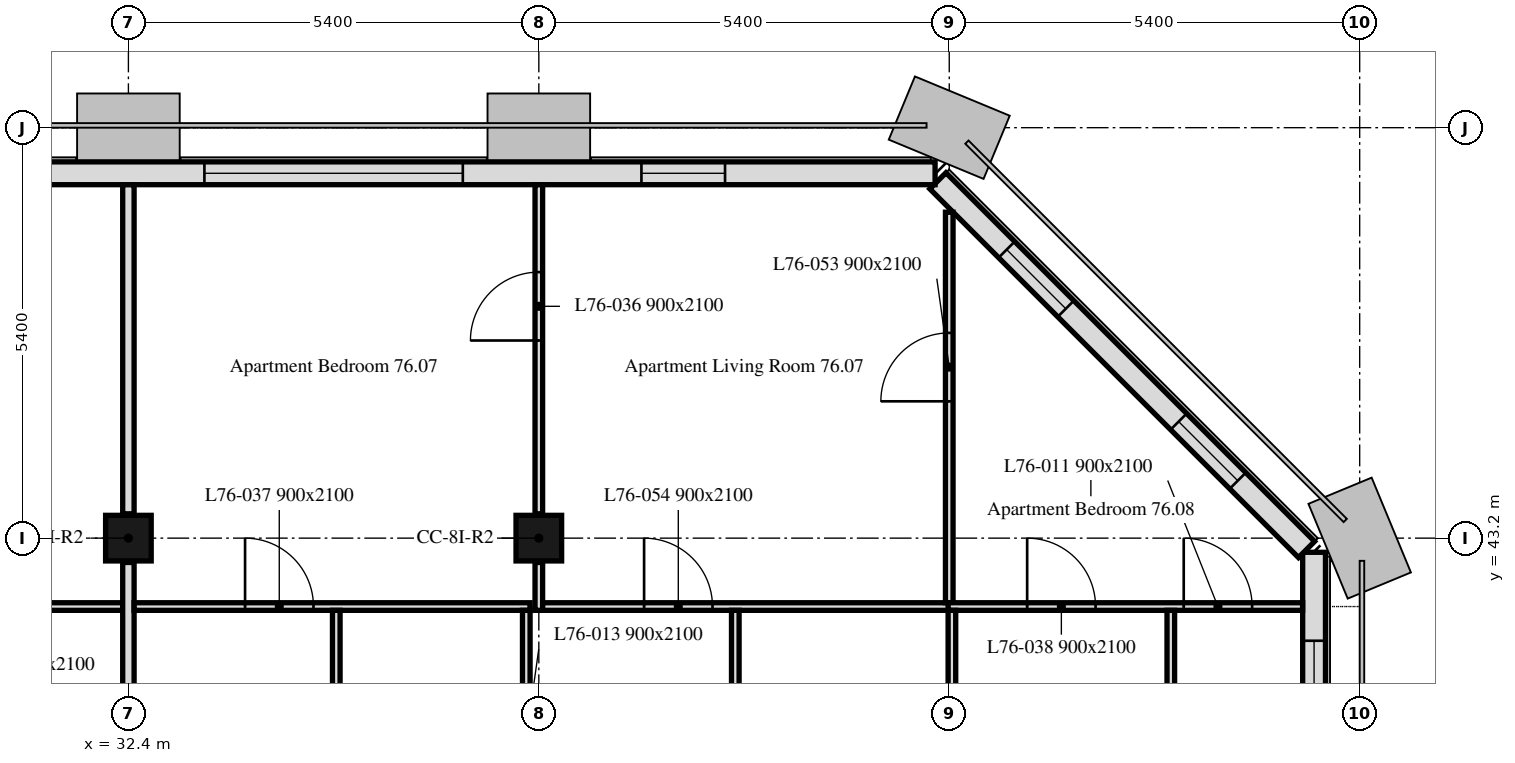
"""IFC4 building model, lengths in metres.
Left out: names, types, materials, properties, quantities, classifications, styles, units other than length and angle.
Written with IfcOpenShell. Run it as: python <this file> out.ifc"""

import sys

from ifc_helpers import new_model, si_unit, direction, frame, frame_2d, origin, origin_2d, place, context, subcontext, project, spatial, rectangle, extrude, element, fill, save


model = new_model("IFC4")
c1 = context("Model", 3, precision=1e-05, world=origin(), true_north=direction((0.0, 1.0)))
c2 = subcontext(c1, "Body", "Model", "MODEL_VIEW")
j1 = project(units=[si_unit("LENGTHUNIT", "METRE"), si_unit("PLANEANGLEUNIT", "RADIAN")], contexts=[c1])
p1 = place(None, origin())
s1 = spatial("IfcSite", under=j1, at=p1, CompositionType="ELEMENT")
p2 = place(p1, origin())
s2 = spatial("IfcBuilding", under=s1, at=p2, CompositionType="ELEMENT")
p3 = place(p2, frame((0.0, 0.0, 304.9)))
s3 = spatial("IfcBuildingStorey", under=s2, at=p3, CompositionType="ELEMENT", Elevation=304.9)
for number, where, z_axis, x_axis in (
    (1, (32.4, 43.2, 0.0), (0.0, 0.0, 1.0), (1.0, 0.0, 0.0)),
    (2, (37.8, 43.2, 0.0), (0.0, 0.0, 1.0), (1.0, 0.0, 0.0)),
):
    element("IfcColumn", number, at=place(p3, frame(where, z_axis=z_axis, x_axis=x_axis)), inside=s3, PredefinedType="COLUMN", context=c2, shape_type="SweptSolid", body=[
        extrude(rectangle(XDim=0.6, YDim=0.6, at=origin_2d()), origin(), (0.0, 0.0, 1.0), 2.8),
    ])
p4 = place(p3, frame((48.0, 10.986, 0.0), z_axis=(0.0, 0.0, 1.0), x_axis=(0.0, 1.0, 0.0)))
e3 = element("IfcWall", 3, at=p4, inside=s3, PredefinedType="SOLIDWALL", context=c2, shape_type="SweptSolid", body=[
    extrude(rectangle(XDim=32.027, YDim=0.3, at=frame_2d((16.014, 0.0))), origin(), (0.0, 0.0, 1.0), 2.8),
])
p5 = place(p4, frame((1.314, 0.0, 0.9)))
e4 = element("IfcOpeningElement", 4, at=p5, cuts=e3, PredefinedType="OPENING", context=c2, shape_type="SweptSolid", body=[
    extrude(rectangle(XDim=1.1, YDim=1.7, at=frame_2d((0.55, 0.85))), frame((0.0, 0.16, 0.0), z_axis=(0.0, -1.0, 0.0), x_axis=(1.0, 0.0, 0.0)), (0.0, 0.0, 1.0), 0.32),
])
p6 = place(p4, frame((2.589, 0.0, 0.9)))
e5 = element("IfcOpeningElement", 5, at=p6, cuts=e3, PredefinedType="OPENING", context=c2, shape_type="SweptSolid", body=[
    extrude(rectangle(XDim=0.65, YDim=1.7, at=frame_2d((0.325, 0.85))), frame((0.0, 0.16, 0.0), z_axis=(0.0, -1.0, 0.0), x_axis=(1.0, 0.0, 0.0)), (0.0, 0.0, 1.0), 0.32),
])
p7 = place(p4, frame((6.214, 0.0, 0.9)))
e6 = element("IfcOpeningElement", 6, at=p7, cuts=e3, PredefinedType="OPENING", context=c2, shape_type="SweptSolid", body=[
    extrude(rectangle(XDim=3.4, YDim=1.7, at=frame_2d((1.7, 0.85))), frame((0.0, 0.16, 0.0), z_axis=(0.0, -1.0, 0.0), x_axis=(1.0, 0.0, 0.0)), (0.0, 0.0, 1.0), 0.32),
])
p8 = place(p4, frame((11.964, 0.0, 0.9)))
e7 = element("IfcOpeningElement", 7, at=p8, cuts=e3, PredefinedType="OPENING", context=c2, shape_type="SweptSolid", body=[
    extrude(rectangle(XDim=1.1, YDim=1.7, at=frame_2d((0.55, 0.85))), frame((0.0, 0.16, 0.0), z_axis=(0.0, -1.0, 0.0), x_axis=(1.0, 0.0, 0.0)), (0.0, 0.0, 1.0), 0.32),
])
p9 = place(p4, frame((13.564, 0.0, 0.9)))
e8 = element("IfcOpeningElement", 8, at=p9, cuts=e3, PredefinedType="OPENING", context=c2, shape_type="SweptSolid", body=[
    extrude(rectangle(XDim=1.1, YDim=1.7, at=frame_2d((0.55, 0.85))), frame((0.0, 0.16, 0.0), z_axis=(0.0, -1.0, 0.0), x_axis=(1.0, 0.0, 0.0)), (0.0, 0.0, 1.0), 0.32),
])
p10 = place(p4, frame((17.014, 0.0, 0.9)))
e9 = element("IfcOpeningElement", 9, at=p10, cuts=e3, PredefinedType="OPENING", context=c2, shape_type="SweptSolid", body=[
    extrude(rectangle(XDim=3.4, YDim=1.7, at=frame_2d((1.7, 0.85))), frame((0.0, 0.16, 0.0), z_axis=(0.0, -1.0, 0.0), x_axis=(1.0, 0.0, 0.0)), (0.0, 0.0, 1.0), 0.32),
])
p11 = place(p4, frame((23.389, 0.0, 0.9)))
e10 = element("IfcOpeningElement", 10, at=p11, cuts=e3, PredefinedType="OPENING", context=c2, shape_type="SweptSolid", body=[
    extrude(rectangle(XDim=0.65, YDim=1.7, at=frame_2d((0.325, 0.85))), frame((0.0, 0.16, 0.0), z_axis=(0.0, -1.0, 0.0), x_axis=(1.0, 0.0, 0.0)), (0.0, 0.0, 1.0), 0.32),
])
p12 = place(p4, frame((24.364, 0.0, 0.9)))
e11 = element("IfcOpeningElement", 11, at=p12, cuts=e3, PredefinedType="OPENING", context=c2, shape_type="SweptSolid", body=[
    extrude(rectangle(XDim=1.1, YDim=1.7, at=frame_2d((0.55, 0.85))), frame((0.0, 0.16, 0.0), z_axis=(0.0, -1.0, 0.0), x_axis=(1.0, 0.0, 0.0)), (0.0, 0.0, 1.0), 0.32),
])
p13 = place(p4, frame((28.164, 0.0, 0.9)))
e12 = element("IfcOpeningElement", 12, at=p13, cuts=e3, PredefinedType="OPENING", context=c2, shape_type="SweptSolid", body=[
    extrude(rectangle(XDim=1.1, YDim=1.7, at=frame_2d((0.55, 0.85))), frame((0.0, 0.16, 0.0), z_axis=(0.0, -1.0, 0.0), x_axis=(1.0, 0.0, 0.0)), (0.0, 0.0, 1.0), 0.32),
])
p14 = place(p4, frame((29.764, 0.0, 0.9)))
e13 = element("IfcOpeningElement", 13, at=p14, cuts=e3, PredefinedType="OPENING", context=c2, shape_type="SweptSolid", body=[
    extrude(rectangle(XDim=1.1, YDim=1.7, at=frame_2d((0.55, 0.85))), frame((0.0, 0.16, 0.0), z_axis=(0.0, -1.0, 0.0), x_axis=(1.0, 0.0, 0.0)), (0.0, 0.0, 1.0), 0.32),
])
p15 = place(p3, frame((47.901, 43.051, 0.0), z_axis=(0.0, 0.0, 1.0), x_axis=(-0.707106781187, 0.707106781187, 0.0)))
e14 = element("IfcWall", 14, at=p15, inside=s3, PredefinedType="SOLIDWALL", context=c2, shape_type="SweptSolid", body=[
    extrude(rectangle(XDim=6.86, YDim=0.3, at=frame_2d((3.43, 0.0))), origin(), (0.0, 0.0, 1.0), 2.8),
])
p16 = place(p15, frame((1.28, 0.0, 0.9)))
e15 = element("IfcOpeningElement", 15, at=p16, cuts=e14, PredefinedType="OPENING", context=c2, shape_type="SweptSolid", body=[
    extrude(rectangle(XDim=1.1, YDim=1.7, at=frame_2d((0.55, 0.85))), frame((0.0, 0.16, 0.0), z_axis=(0.0, -1.0, 0.0), x_axis=(1.0, 0.0, 0.0)), (0.0, 0.0, 1.0), 0.32),
])
p17 = place(p15, frame((4.48, 0.0, 0.9)))
e16 = element("IfcOpeningElement", 16, at=p17, cuts=e14, PredefinedType="OPENING", context=c2, shape_type="SweptSolid", body=[
    extrude(rectangle(XDim=1.1, YDim=1.7, at=frame_2d((0.55, 0.85))), frame((0.0, 0.16, 0.0), z_axis=(0.0, -1.0, 0.0), x_axis=(1.0, 0.0, 0.0)), (0.0, 0.0, 1.0), 0.32),
])
p18 = place(p3, frame((43.014, 48.0, 0.0), z_axis=(0.0, 0.0, 1.0), x_axis=(-1.0, 0.0, 0.0)))
e17 = element("IfcWall", 17, at=p18, inside=s3, PredefinedType="SOLIDWALL", context=c2, shape_type="SweptSolid", body=[
    extrude(rectangle(XDim=32.027, YDim=0.3, at=frame_2d((16.014, 0.0))), origin(), (0.0, 0.0, 1.0), 2.8),
])
p19 = place(p18, frame((2.764, 0.0, 0.9)))
e18 = element("IfcOpeningElement", 18, at=p19, cuts=e17, PredefinedType="OPENING", context=c2, shape_type="SweptSolid", body=[
    extrude(rectangle(XDim=1.1, YDim=1.7, at=frame_2d((0.55, 0.85))), frame((0.0, 0.16, 0.0), z_axis=(0.0, -1.0, 0.0), x_axis=(1.0, 0.0, 0.0)), (0.0, 0.0, 1.0), 0.32),
])
p20 = place(p18, frame((6.214, 0.0, 0.9)))
e19 = element("IfcOpeningElement", 19, at=p20, cuts=e17, PredefinedType="OPENING", context=c2, shape_type="SweptSolid", body=[
    extrude(rectangle(XDim=3.4, YDim=1.7, at=frame_2d((1.7, 0.85))), frame((0.0, 0.16, 0.0), z_axis=(0.0, -1.0, 0.0), x_axis=(1.0, 0.0, 0.0)), (0.0, 0.0, 1.0), 0.32),
])
p21 = place(p18, frame((13.564, 0.0, 0.9)))
e20 = element("IfcOpeningElement", 20, at=p21, cuts=e17, PredefinedType="OPENING", context=c2, shape_type="SweptSolid", body=[
    extrude(rectangle(XDim=1.1, YDim=1.7, at=frame_2d((0.55, 0.85))), frame((0.0, 0.16, 0.0), z_axis=(0.0, -1.0, 0.0), x_axis=(1.0, 0.0, 0.0)), (0.0, 0.0, 1.0), 0.32),
])
p22 = place(p18, frame((17.014, 0.0, 0.9)))
e21 = element("IfcOpeningElement", 21, at=p22, cuts=e17, PredefinedType="OPENING", context=c2, shape_type="SweptSolid", body=[
    extrude(rectangle(XDim=3.4, YDim=1.7, at=frame_2d((1.7, 0.85))), frame((0.0, 0.16, 0.0), z_axis=(0.0, -1.0, 0.0), x_axis=(1.0, 0.0, 0.0)), (0.0, 0.0, 1.0), 0.32),
])
p23 = place(p18, frame((24.364, 0.0, 0.9)))
e22 = element("IfcOpeningElement", 22, at=p23, cuts=e17, PredefinedType="OPENING", context=c2, shape_type="SweptSolid", body=[
    extrude(rectangle(XDim=1.1, YDim=1.7, at=frame_2d((0.55, 0.85))), frame((0.0, 0.16, 0.0), z_axis=(0.0, -1.0, 0.0), x_axis=(1.0, 0.0, 0.0)), (0.0, 0.0, 1.0), 0.32),
])
p24 = place(p18, frame((27.814, 0.0, 0.9)))
e23 = element("IfcOpeningElement", 23, at=p24, cuts=e17, PredefinedType="OPENING", context=c2, shape_type="SweptSolid", body=[
    extrude(rectangle(XDim=3.4, YDim=1.7, at=frame_2d((1.7, 0.85))), frame((0.0, 0.16, 0.0), z_axis=(0.0, -1.0, 0.0), x_axis=(1.0, 0.0, 0.0)), (0.0, 0.0, 1.0), 0.32),
])
p25 = place(p3, frame((27.05, 42.3, 0.0), z_axis=(0.0, 0.0, 1.0), x_axis=(1.0, 0.0, 0.0)))
e24 = element("IfcWall", 24, at=p25, inside=s3, PredefinedType="PARTITIONING", context=c2, shape_type="SweptSolid", body=[
    extrude(rectangle(XDim=5.275, YDim=0.1, at=frame_2d((2.637, 0.0))), origin(), (0.0, 0.0, 1.0), 2.8),
])
p26 = place(p25, frame((2.7, 0.0, 0.0)))
e25 = element("IfcOpeningElement", 25, at=p26, cuts=e24, PredefinedType="OPENING", context=c2, shape_type="SweptSolid", body=[
    extrude(rectangle(XDim=0.9, YDim=2.1, at=frame_2d((0.45, 1.05))), frame((0.0, 0.05, 0.0), z_axis=(0.0, -1.0, 0.0), x_axis=(1.0, 0.0, 0.0)), (0.0, 0.0, 1.0), 0.1),
])
p27 = place(p3, frame((32.4, 43.52, 0.0), z_axis=(0.0, 0.0, 1.0), x_axis=(0.0, 1.0, 0.0)))
e26 = element("IfcWall", 26, at=p27, inside=s3, PredefinedType="PARTITIONING", context=c2, shape_type="SweptSolid", body=[
    extrude(rectangle(XDim=4.329, YDim=0.15, at=frame_2d((2.165, 0.0))), origin(), (0.0, 0.0, 1.0), 2.2),
])
p28 = place(p3, frame((32.4, 38.12, 0.0), z_axis=(0.0, 0.0, 1.0), x_axis=(0.0, 1.0, 0.0)))
e27 = element("IfcWall", 27, at=p28, inside=s3, PredefinedType="PARTITIONING", context=c2, shape_type="SweptSolid", body=[
    extrude(rectangle(XDim=4.76, YDim=0.15, at=frame_2d((2.38, 0.0))), origin(), (0.0, 0.0, 1.0), 2.2),
])
p29 = place(p3, frame((32.475, 42.3, 0.0), z_axis=(0.0, 0.0, 1.0), x_axis=(1.0, 0.0, 0.0)))
e28 = element("IfcWall", 28, at=p29, inside=s3, PredefinedType="PARTITIONING", context=c2, shape_type="SweptSolid", body=[
    extrude(rectangle(XDim=5.21, YDim=0.1, at=frame_2d((2.605, 0.0))), origin(), (0.0, 0.0, 1.0), 2.8),
])
p30 = place(p29, frame((1.46, 0.0, 0.0)))
e29 = element("IfcOpeningElement", 29, at=p30, cuts=e28, PredefinedType="OPENING", context=c2, shape_type="SweptSolid", body=[
    extrude(rectangle(XDim=0.9, YDim=2.1, at=frame_2d((0.45, 1.05))), frame((0.0, 0.05, 0.0), z_axis=(0.0, -1.0, 0.0), x_axis=(1.0, 0.0, 0.0)), (0.0, 0.0, 1.0), 0.1),
])
p31 = place(p3, frame((37.8, 42.25, 0.0), z_axis=(0.0, 0.0, 1.0), x_axis=(0.0, 1.0, 0.0)))
e30 = element("IfcWall", 30, at=p31, inside=s3, PredefinedType="PARTITIONING", context=c2, shape_type="SweptSolid", body=[
    extrude(rectangle(XDim=0.63, YDim=0.1, at=frame_2d((0.315, 0.0))), origin(), (0.0, 0.0, 1.0), 2.8),
])
p32 = place(p3, frame((37.8, 43.52, 0.0), z_axis=(0.0, 0.0, 1.0), x_axis=(0.0, 1.0, 0.0)))
e31 = element("IfcWall", 31, at=p32, inside=s3, PredefinedType="PARTITIONING", context=c2, shape_type="SweptSolid", body=[
    extrude(rectangle(XDim=4.329, YDim=0.1, at=frame_2d((2.165, 0.0))), origin(), (0.0, 0.0, 1.0), 2.8),
])
p33 = place(p32, frame((2.28, 0.0, 0.0)))
e32 = element("IfcOpeningElement", 32, at=p33, cuts=e31, PredefinedType="OPENING", context=c2, shape_type="SweptSolid", body=[
    extrude(rectangle(XDim=0.9, YDim=2.1, at=frame_2d((0.45, 1.05))), frame((0.0, 0.05, 0.0), z_axis=(0.0, -1.0, 0.0), x_axis=(1.0, 0.0, 0.0)), (0.0, 0.0, 1.0), 0.1),
])
p34 = place(p3, frame((37.85, 42.3, 0.0), z_axis=(0.0, 0.0, 1.0), x_axis=(1.0, 0.0, 0.0)))
e33 = element("IfcWall", 33, at=p34, inside=s3, PredefinedType="PARTITIONING", context=c2, shape_type="SweptSolid", body=[
    extrude(rectangle(XDim=5.4, YDim=0.1, at=frame_2d((2.7, 0.0))), origin(), (0.0, 0.0, 1.0), 2.8),
])
p35 = place(p34, frame((1.335, 0.0, 0.0)))
e34 = element("IfcOpeningElement", 34, at=p35, cuts=e33, PredefinedType="OPENING", context=c2, shape_type="SweptSolid", body=[
    extrude(rectangle(XDim=0.9, YDim=2.1, at=frame_2d((0.45, 1.05))), frame((0.0, 0.05, 0.0), z_axis=(0.0, -1.0, 0.0), x_axis=(1.0, 0.0, 0.0)), (0.0, 0.0, 1.0), 0.1),
])
p36 = place(p3, frame((43.2, 42.35, 0.0), z_axis=(0.0, 0.0, 1.0), x_axis=(0.0, 1.0, 0.0)))
e35 = element("IfcWall", 35, at=p36, inside=s3, PredefinedType="PARTITIONING", context=c2, shape_type="SweptSolid", body=[
    extrude(rectangle(XDim=5.138, YDim=0.1, at=frame_2d((2.569, 0.0))), origin(), (0.0, 0.0, 1.0), 2.8),
])
p37 = place(p36, frame((2.65, 0.0, 0.0)))
e36 = element("IfcOpeningElement", 36, at=p37, cuts=e35, PredefinedType="OPENING", context=c2, shape_type="SweptSolid", body=[
    extrude(rectangle(XDim=0.9, YDim=2.1, at=frame_2d((0.45, 1.05))), frame((0.0, 0.05, 0.0), z_axis=(0.0, -1.0, 0.0), x_axis=(1.0, 0.0, 0.0)), (0.0, 0.0, 1.0), 0.1),
])
p38 = place(p3, frame((43.185, 42.3, 0.0), z_axis=(0.0, 0.0, 1.0), x_axis=(1.0, 0.0, 0.0)))
e37 = element("IfcWall", 37, at=p38, inside=s3, PredefinedType="PARTITIONING", context=c2, shape_type="SweptSolid", body=[
    extrude(rectangle(XDim=4.664, YDim=0.1, at=frame_2d((2.332, 0.0))), origin(), (0.0, 0.0, 1.0), 2.8),
])
p39 = place(p38, frame((3.1, 0.0, 0.0)))
e38 = element("IfcOpeningElement", 38, at=p39, cuts=e37, PredefinedType="OPENING", context=c2, shape_type="SweptSolid", body=[
    extrude(rectangle(XDim=0.9, YDim=2.1, at=frame_2d((0.45, 1.05))), frame((0.0, 0.05, 0.0), z_axis=(0.0, -1.0, 0.0), x_axis=(1.0, 0.0, 0.0)), (0.0, 0.0, 1.0), 0.1),
])
p40 = place(p38, frame((1.04, 0.0, 0.0)))
e39 = element("IfcOpeningElement", 39, at=p40, cuts=e37, PredefinedType="OPENING", context=c2, shape_type="SweptSolid", body=[
    extrude(rectangle(XDim=0.9, YDim=2.1, at=frame_2d((0.45, 1.05))), frame((0.0, 0.05, 0.0), z_axis=(0.0, -1.0, 0.0), x_axis=(1.0, 0.0, 0.0)), (0.0, 0.0, 1.0), 0.1),
])
p41 = place(p3, frame((35.135, 36.95, 0.0), z_axis=(0.0, 0.0, 1.0), x_axis=(0.0, 1.0, 0.0)))
e40 = element("IfcWall", 40, at=p41, inside=s3, PredefinedType="PARTITIONING", context=c2, shape_type="SweptSolid", body=[
    extrude(rectangle(XDim=5.3, YDim=0.1, at=frame_2d((2.65, 0.0))), origin(), (0.0, 0.0, 1.0), 2.2),
])
p42 = place(p3, frame((37.635, 38.12, 0.0), z_axis=(0.0, 0.0, 1.0), x_axis=(0.0, 1.0, 0.0)))
e41 = element("IfcWall", 41, at=p42, inside=s3, PredefinedType="PARTITIONING", context=c2, shape_type="SweptSolid", body=[
    extrude(rectangle(XDim=4.13, YDim=0.1, at=frame_2d((2.065, 0.0))), origin(), (0.0, 0.0, 1.0), 2.8),
])
p43 = place(p42, frame((2.005, 0.0, 0.0)))
e42 = element("IfcOpeningElement", 42, at=p43, cuts=e41, PredefinedType="OPENING", context=c2, shape_type="SweptSolid", body=[
    extrude(rectangle(XDim=0.9, YDim=2.1, at=frame_2d((0.45, 1.05))), frame((0.0, 0.05, 0.0), z_axis=(0.0, -1.0, 0.0), x_axis=(1.0, 0.0, 0.0)), (0.0, 0.0, 1.0), 0.1),
])
p44 = place(p3, frame((40.385, 34.275, 0.0), z_axis=(0.0, 0.0, 1.0), x_axis=(0.0, 1.0, 0.0)))
e43 = element("IfcWall", 43, at=p44, inside=s3, PredefinedType="PARTITIONING", context=c2, shape_type="SweptSolid", body=[
    extrude(rectangle(XDim=7.975, YDim=0.1, at=frame_2d((3.988, 0.0))), origin(), (0.0, 0.0, 1.0), 2.2),
])
p45 = place(p44, frame((4.875, 0.0, 0.0)))
e44 = element("IfcOpeningElement", 44, at=p45, cuts=e43, PredefinedType="OPENING", context=c2, shape_type="SweptSolid", body=[
    extrude(rectangle(XDim=0.9, YDim=2.1, at=frame_2d((0.45, 1.05))), frame((0.0, 0.05, 0.0), z_axis=(0.0, -1.0, 0.0), x_axis=(1.0, 0.0, 0.0)), (0.0, 0.0, 1.0), 0.1),
])
p46 = place(p44, frame((0.262, 0.0, 0.0)))
e45 = element("IfcOpeningElement", 45, at=p46, cuts=e43, PredefinedType="OPENING", context=c2, shape_type="SweptSolid", body=[
    extrude(rectangle(XDim=0.9, YDim=2.1, at=frame_2d((0.45, 1.05))), frame((0.0, 0.05, 0.0), z_axis=(0.0, -1.0, 0.0), x_axis=(1.0, 0.0, 0.0)), (0.0, 0.0, 1.0), 0.1),
])
p47 = place(p3, frame((43.235, 38.12, 0.0), z_axis=(0.0, 0.0, 1.0), x_axis=(0.0, 1.0, 0.0)))
e46 = element("IfcWall", 46, at=p47, inside=s3, PredefinedType="PARTITIONING", context=c2, shape_type="SweptSolid", body=[
    extrude(rectangle(XDim=4.13, YDim=0.1, at=frame_2d((2.065, 0.0))), origin(), (0.0, 0.0, 1.0), 2.8),
])
p48 = place(p3, frame((46.115, 34.275, 0.0), z_axis=(0.0, 0.0, 1.0), x_axis=(0.0, 1.0, 0.0)))
e47 = element("IfcWall", 47, at=p48, inside=s3, PredefinedType="PARTITIONING", context=c2, shape_type="SweptSolid", body=[
    extrude(rectangle(XDim=7.975, YDim=0.1, at=frame_2d((3.988, 0.0))), origin(), (0.0, 0.0, 1.0), 2.2),
])
p49 = place(p14, origin())
e48 = element("IfcWindow", 48, at=p49, inside=s3, PartitioningType="SINGLE_PANEL", PredefinedType="WINDOW", context=c2, shape_type="SweptSolid", body=[
    extrude(rectangle(XDim=1.1, YDim=1.7, at=frame_2d((0.55, 0.85))), frame((0.0, 0.03, 0.0), z_axis=(0.0, -1.0, 0.0), x_axis=(1.0, 0.0, 0.0)), (0.0, 0.0, 1.0), 0.06),
])
fill(e13, e48)
p50 = place(p16, origin())
e49 = element("IfcWindow", 49, at=p50, inside=s3, PartitioningType="SINGLE_PANEL", PredefinedType="WINDOW", context=c2, shape_type="SweptSolid", body=[
    extrude(rectangle(XDim=1.1, YDim=1.7, at=frame_2d((0.55, 0.85))), frame((0.0, 0.03, 0.0), z_axis=(0.0, -1.0, 0.0), x_axis=(1.0, 0.0, 0.0)), (0.0, 0.0, 1.0), 0.06),
])
fill(e15, e49)
p51 = place(p17, origin())
e50 = element("IfcWindow", 50, at=p51, inside=s3, PartitioningType="SINGLE_PANEL", PredefinedType="WINDOW", context=c2, shape_type="SweptSolid", body=[
    extrude(rectangle(XDim=1.1, YDim=1.7, at=frame_2d((0.55, 0.85))), frame((0.0, 0.03, 0.0), z_axis=(0.0, -1.0, 0.0), x_axis=(1.0, 0.0, 0.0)), (0.0, 0.0, 1.0), 0.06),
])
fill(e16, e50)
p52 = place(p19, origin())
e51 = element("IfcWindow", 51, at=p52, inside=s3, PartitioningType="SINGLE_PANEL", PredefinedType="WINDOW", context=c2, shape_type="SweptSolid", body=[
    extrude(rectangle(XDim=1.1, YDim=1.7, at=frame_2d((0.55, 0.85))), frame((0.0, 0.03, 0.0), z_axis=(0.0, -1.0, 0.0), x_axis=(1.0, 0.0, 0.0)), (0.0, 0.0, 1.0), 0.06),
])
fill(e18, e51)
p53 = place(p20, origin())
e52 = element("IfcWindow", 52, at=p53, inside=s3, PartitioningType="SINGLE_PANEL", PredefinedType="WINDOW", context=c2, shape_type="SweptSolid", body=[
    extrude(rectangle(XDim=3.4, YDim=1.7, at=frame_2d((1.7, 0.85))), frame((0.0, 0.03, 0.0), z_axis=(0.0, -1.0, 0.0), x_axis=(1.0, 0.0, 0.0)), (0.0, 0.0, 1.0), 0.06),
])
fill(e19, e52)
p54 = place(p39, origin())
e53 = element("IfcDoor", 53, at=p54, inside=s3, OperationType="SINGLE_SWING_RIGHT", PredefinedType="DOOR", context=c2, shape_type="SweptSolid", body=[
    extrude(rectangle(XDim=0.9, YDim=2.1, at=frame_2d((0.45, 1.05))), frame((0.0, 0.025, 0.0), z_axis=(0.0, -1.0, 0.0), x_axis=(1.0, 0.0, 0.0)), (0.0, 0.0, 1.0), 0.05),
])
fill(e38, e53)
p55 = place(p33, origin())
e54 = element("IfcDoor", 54, at=p55, inside=s3, OperationType="SINGLE_SWING_LEFT", PredefinedType="DOOR", context=c2, shape_type="SweptSolid", body=[
    extrude(rectangle(XDim=0.9, YDim=2.1, at=frame_2d((0.45, 1.05))), frame((0.0, 0.025, 0.0), z_axis=(0.0, -1.0, 0.0), x_axis=(1.0, 0.0, 0.0)), (0.0, 0.0, 1.0), 0.05),
])
fill(e32, e54)
p56 = place(p30, origin())
e55 = element("IfcDoor", 55, at=p56, inside=s3, OperationType="SINGLE_SWING_RIGHT", PredefinedType="DOOR", context=c2, shape_type="SweptSolid", body=[
    extrude(rectangle(XDim=0.9, YDim=2.1, at=frame_2d((0.45, 1.05))), frame((0.0, 0.025, 0.0), z_axis=(0.0, -1.0, 0.0), x_axis=(1.0, 0.0, 0.0)), (0.0, 0.0, 1.0), 0.05),
])
fill(e29, e55)
p57 = place(p40, origin())
e56 = element("IfcDoor", 56, at=p57, inside=s3, OperationType="SINGLE_SWING_LEFT", PredefinedType="DOOR", context=c2, shape_type="SweptSolid", body=[
    extrude(rectangle(XDim=0.9, YDim=2.1, at=frame_2d((0.45, 1.05))), frame((0.0, 0.025, 0.0), z_axis=(0.0, -1.0, 0.0), x_axis=(1.0, 0.0, 0.0)), (0.0, 0.0, 1.0), 0.05),
])
fill(e39, e56)
p58 = place(p37, origin())
e57 = element("IfcDoor", 57, at=p58, inside=s3, OperationType="SINGLE_SWING_RIGHT", PredefinedType="DOOR", context=c2, shape_type="SweptSolid", body=[
    extrude(rectangle(XDim=0.9, YDim=2.1, at=frame_2d((0.45, 1.05))), frame((0.0, 0.025, 0.0), z_axis=(0.0, -1.0, 0.0), x_axis=(1.0, 0.0, 0.0)), (0.0, 0.0, 1.0), 0.05),
])
fill(e36, e57)
p59 = place(p35, origin())
e58 = element("IfcDoor", 58, at=p59, inside=s3, OperationType="SINGLE_SWING_RIGHT", PredefinedType="DOOR", context=c2, shape_type="SweptSolid", body=[
    extrude(rectangle(XDim=0.9, YDim=2.1, at=frame_2d((0.45, 1.05))), frame((0.0, 0.025, 0.0), z_axis=(0.0, -1.0, 0.0), x_axis=(1.0, 0.0, 0.0)), (0.0, 0.0, 1.0), 0.05),
])
fill(e34, e58)
save(model, sys.argv[1])
